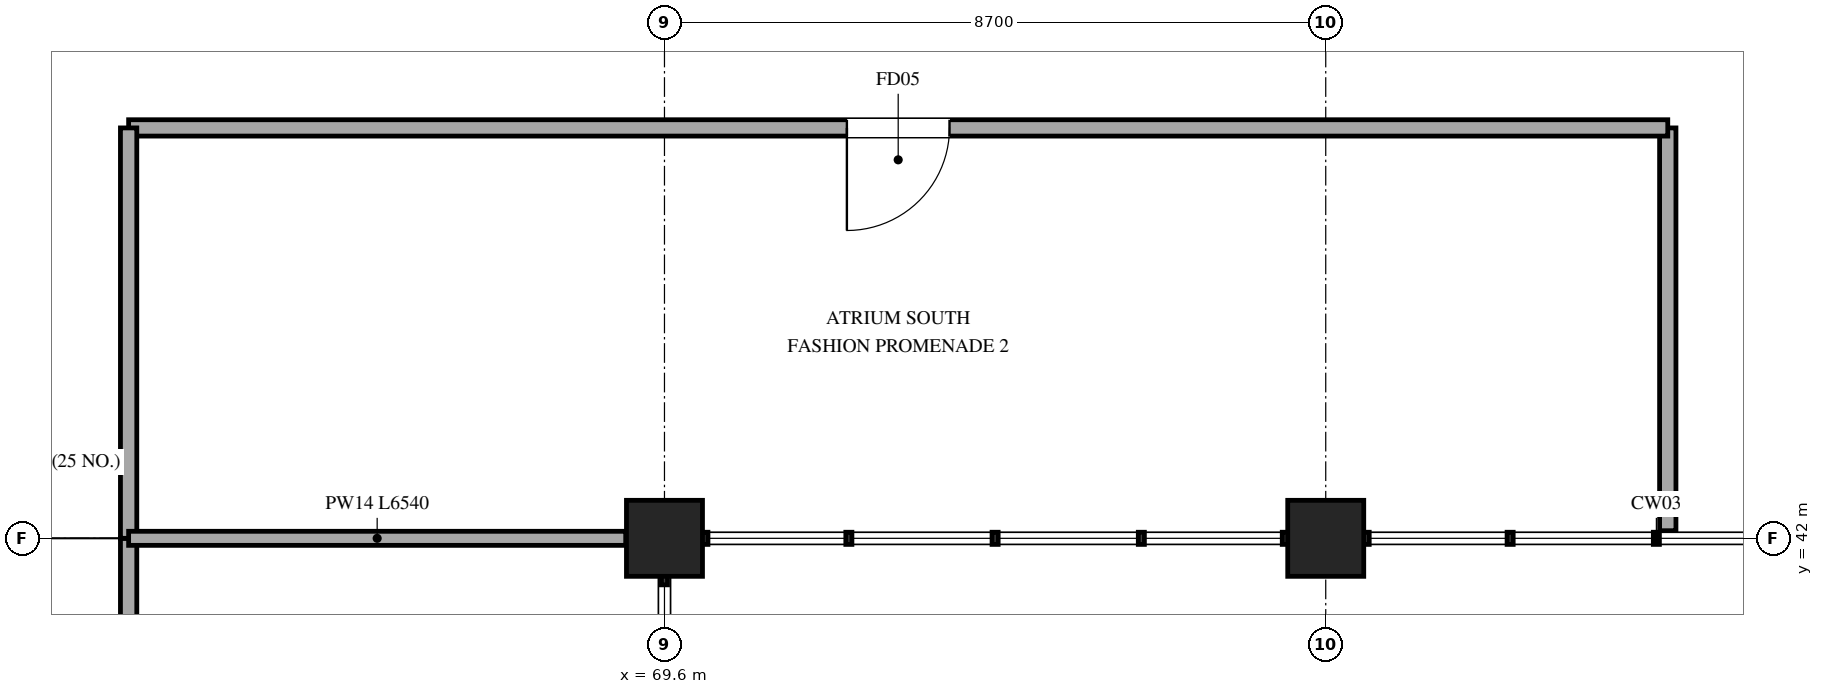
"""IFC4 building model, lengths in metres.
Left out: names, types, materials, properties, quantities, classifications, styles, units other than length and angle.
Written with IfcOpenShell. Run it as: python <this file> out.ifc"""

import sys

from ifc_helpers import new_model, si_unit, direction, frame, frame_2d, origin, origin_2d, place, context, subcontext, project, spatial, rectangle, extrude, element, fill, save


model = new_model("IFC4")
c1 = context("Model", 3, precision=1e-05, world=origin(), true_north=direction((0.0, 1.0)))
c2 = subcontext(c1, "Body", "Model", "MODEL_VIEW")
j1 = project(units=[si_unit("LENGTHUNIT", "METRE"), si_unit("PLANEANGLEUNIT", "RADIAN")], contexts=[c1])
p1 = place(None, origin())
s1 = spatial("IfcSite", under=j1, at=p1, CompositionType="ELEMENT")
p2 = place(p1, origin())
s2 = spatial("IfcBuilding", under=s1, at=p2, CompositionType="ELEMENT")
p3 = place(p2, frame((0.0, 0.0, 6.0)))
s3 = spatial("IfcBuildingStorey", under=s2, at=p3, CompositionType="ELEMENT", Elevation=6.0)
for number, where, z_axis, x_axis in (
    (1, (69.6, 42.0, 0.0), (0.0, 0.0, 1.0), (1.0, 0.0, 0.0)),
    (2, (78.3, 42.0, 0.0), (0.0, 0.0, 1.0), (1.0, 0.0, 0.0)),
):
    element("IfcColumn", number, at=place(p3, frame(where, z_axis=z_axis, x_axis=x_axis)), inside=s3, PredefinedType="COLUMN", context=c2, shape_type="SweptSolid", body=[
        extrude(rectangle(XDim=1.0, YDim=1.0, at=origin_2d()), origin(), (0.0, 0.0, 1.0), 5.4),
    ])
p4 = place(p3, frame((62.55, 42.0, 0.0), z_axis=(0.0, 0.0, 1.0), x_axis=(0.0, -1.0, 0.0)))
e3 = element("IfcWall", 3, at=p4, inside=s3, PredefinedType="PARTITIONING", context=c2, shape_type="SweptSolid", body=[
    extrude(rectangle(XDim=4.0, YDim=0.215, at=frame_2d((2.0, 0.0))), origin(), (0.0, 0.0, 1.0), 4.31),
])
p5 = place(p4, frame((1.325, 0.0, 0.0)))
e4 = element("IfcOpeningElement", 4, at=p5, cuts=e3, PredefinedType="OPENING", context=c2, shape_type="SweptSolid", body=[
    extrude(rectangle(XDim=1.35, YDim=2.2, at=frame_2d((0.675, 1.1))), frame((0.0, 0.118, 0.0), z_axis=(0.0, -1.0, 0.0), x_axis=(1.0, 0.0, 0.0)), (0.0, 0.0, 1.0), 0.235),
])
p6 = place(p3, frame((82.8, 42.1, 0.0), z_axis=(0.0, 0.0, 1.0), x_axis=(0.0, 1.0, 0.0)))
e5 = element("IfcWall", 5, at=p6, inside=s3, PredefinedType="PARTITIONING", context=c2, shape_type="SweptSolid", body=[
    extrude(rectangle(XDim=5.3, YDim=0.215, at=frame_2d((2.65, 0.0))), origin(), (0.0, 0.0, 1.0), 4.46),
])
p7 = place(p3, frame((82.8, 47.4, 0.0), z_axis=(0.0, 0.0, 1.0), x_axis=(-1.0, 0.0, 0.0)))
e6 = element("IfcWall", 6, at=p7, inside=s3, PredefinedType="PARTITIONING", context=c2, shape_type="SweptSolid", body=[
    extrude(rectangle(XDim=20.25, YDim=0.215, at=frame_2d((10.125, 0.0))), origin(), (0.0, 0.0, 1.0), 4.31),
])
p8 = place(p7, frame((9.45, 0.0, 0.0)))
e7 = element("IfcOpeningElement", 7, at=p8, cuts=e6, PredefinedType="OPENING", context=c2, shape_type="SweptSolid", body=[
    extrude(rectangle(XDim=1.35, YDim=2.2, at=frame_2d((0.675, 1.1))), frame((0.0, 0.118, 0.0), z_axis=(0.0, -1.0, 0.0), x_axis=(1.0, 0.0, 0.0)), (0.0, 0.0, 1.0), 0.235),
])
p9 = place(p3, frame((62.55, 47.4, 0.0), z_axis=(0.0, 0.0, 1.0), x_axis=(0.0, -1.0, 0.0)))
e8 = element("IfcWall", 8, at=p9, inside=s3, PredefinedType="PARTITIONING", context=c2, shape_type="SweptSolid", body=[
    extrude(rectangle(XDim=5.4, YDim=0.215, at=frame_2d((2.7, 0.0))), origin(), (0.0, 0.0, 1.0), 4.31),
])
p10 = place(p3, frame((62.55, 42.0, 0.0), z_axis=(0.0, 0.0, 1.0), x_axis=(1.0, 0.0, 0.0)))
e9 = element("IfcWall", 9, at=p10, inside=s3, PredefinedType="PARTITIONING", context=c2, shape_type="SweptSolid", body=[
    extrude(rectangle(XDim=6.54, YDim=0.185, at=frame_2d((3.27, 0.0))), origin(), (0.0, 0.0, 1.0), 4.31),
])
p11 = place(p8, origin())
e10 = element("IfcDoor", 10, at=p11, inside=s3, OperationType="SINGLE_SWING_RIGHT", PredefinedType="DOOR", context=c2, shape_type="SweptSolid", body=[
    extrude(rectangle(XDim=1.35, YDim=2.2, at=frame_2d((0.675, 1.1))), frame((0.0, 0.025, 0.0), z_axis=(0.0, -1.0, 0.0), x_axis=(1.0, 0.0, 0.0)), (0.0, 0.0, 1.0), 0.05),
])
fill(e7, e10)
save(model, sys.argv[1])
